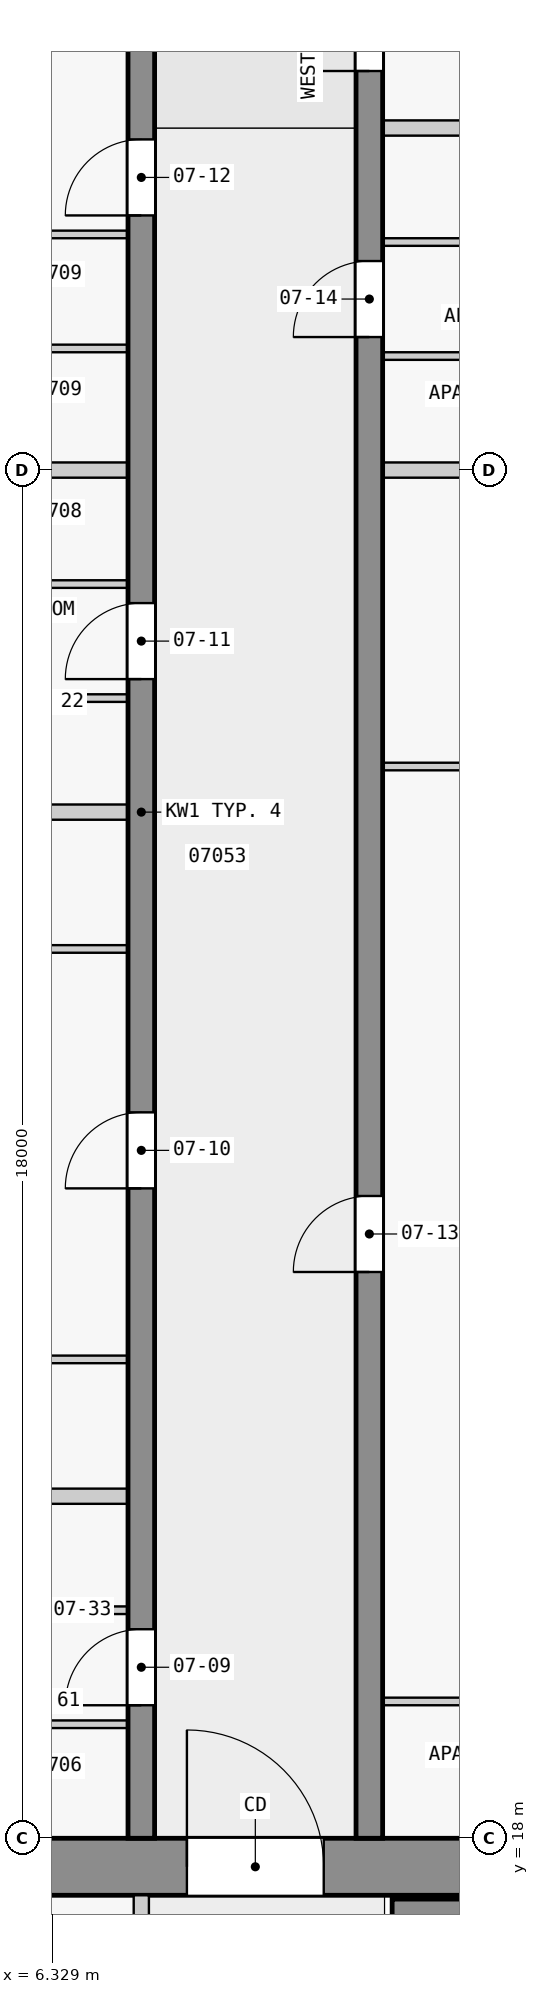
"""IFC4 building model, lengths in metres.
Left out: names, types, materials, properties, quantities, classifications, styles, units other than length and angle.
Written with IfcOpenShell. Run it as: python <this file> out.ifc"""

import sys

from ifc_helpers import new_model, si_unit, direction, frame, frame_2d, origin, place, context, subcontext, project, spatial, rectangle, extrude, element, fill, save


model = new_model("IFC4")
c1 = context("Model", 3, precision=1e-05, world=origin(), true_north=direction((0.0, 1.0)))
c2 = subcontext(c1, "Body", "Model", "MODEL_VIEW")
j1 = project(units=[si_unit("LENGTHUNIT", "METRE"), si_unit("PLANEANGLEUNIT", "RADIAN")], contexts=[c1])
p1 = place(None, origin())
s1 = spatial("IfcSite", under=j1, at=p1, CompositionType="ELEMENT")
p2 = place(p1, origin())
s2 = spatial("IfcBuilding", under=s1, at=p2, CompositionType="ELEMENT")
p3 = place(p2, frame((0.0, 0.0, 33.8)))
s3 = spatial("IfcBuildingStorey", under=s2, at=p3, CompositionType="ELEMENT", Elevation=33.8)
p4 = place(p3, frame((1.55, 17.625, 0.0), z_axis=(0.0, 0.0, 1.0), x_axis=(1.0, 0.0, 0.0)))
e1 = element("IfcWall", 1, at=p4, inside=s3, PredefinedType="SHEAR", context=c2, shape_type="SweptSolid", body=[
    extrude(rectangle(XDim=20.95, YDim=0.75, at=frame_2d((10.475, 0.0))), origin(), (0.0, 0.0, 1.0), 3.25),
])
p5 = place(p4, frame((6.55, 0.0, 0.0)))
e2 = element("IfcOpeningElement", 2, at=p5, cuts=e1, PredefinedType="OPENING", context=c2, shape_type="SweptSolid", body=[
    extrude(rectangle(XDim=1.8, YDim=2.1, at=frame_2d((0.9, 1.05))), frame((0.0, 0.385, 0.0), z_axis=(0.0, -1.0, 0.0), x_axis=(1.0, 0.0, 0.0)), (0.0, 0.0, 1.0), 0.77),
])
p6 = place(p3, frame((10.8, 17.05, 0.0), z_axis=(0.0, 0.0, 1.0), x_axis=(1.0, 0.0, 0.0)))
e3 = element("IfcWall", 3, at=p6, inside=s3, PredefinedType="SHEAR", context=c2, shape_type="SweptSolid", body=[
    extrude(rectangle(XDim=7.8, YDim=0.3, at=frame_2d((3.9, 0.0))), origin(), (0.0, 0.0, 1.0), 3.25),
])
p7 = place(p3, frame((7.5, 18.0, 0.0), z_axis=(0.0, 0.0, 1.0), x_axis=(0.0, 1.0, 0.0)))
e4 = element("IfcWall", 4, at=p7, inside=s3, PredefinedType="SHEAR", context=c2, shape_type="SweptSolid", body=[
    extrude(rectangle(XDim=27.0, YDim=0.35, at=frame_2d((13.5, 0.0))), origin(), (0.0, 0.0, 1.0), 3.25),
])
p8 = place(p7, frame((1.75, 0.0, 0.0)))
e5 = element("IfcOpeningElement", 5, at=p8, cuts=e4, PredefinedType="OPENING", context=c2, shape_type="SweptSolid", body=[
    extrude(rectangle(XDim=1.0, YDim=2.1, at=frame_2d((0.5, 1.05))), frame((0.0, 0.185, 0.0), z_axis=(0.0, -1.0, 0.0), x_axis=(1.0, 0.0, 0.0)), (0.0, 0.0, 1.0), 0.37),
])
p9 = place(p7, frame((8.55, 0.0, 0.0)))
e6 = element("IfcOpeningElement", 6, at=p9, cuts=e4, PredefinedType="OPENING", context=c2, shape_type="SweptSolid", body=[
    extrude(rectangle(XDim=1.0, YDim=2.1, at=frame_2d((0.5, 1.05))), frame((0.0, 0.185, 0.0), z_axis=(0.0, -1.0, 0.0), x_axis=(1.0, 0.0, 0.0)), (0.0, 0.0, 1.0), 0.37),
])
p10 = place(p7, frame((15.25, 0.0, 0.0)))
e7 = element("IfcOpeningElement", 7, at=p10, cuts=e4, PredefinedType="OPENING", context=c2, shape_type="SweptSolid", body=[
    extrude(rectangle(XDim=1.0, YDim=2.1, at=frame_2d((0.5, 1.05))), frame((0.0, 0.185, 0.0), z_axis=(0.0, -1.0, 0.0), x_axis=(1.0, 0.0, 0.0)), (0.0, 0.0, 1.0), 0.37),
])
p11 = place(p7, frame((21.35, 0.0, 0.0)))
e8 = element("IfcOpeningElement", 8, at=p11, cuts=e4, PredefinedType="OPENING", context=c2, shape_type="SweptSolid", body=[
    extrude(rectangle(XDim=1.0, YDim=2.1, at=frame_2d((0.5, 1.05))), frame((0.0, 0.185, 0.0), z_axis=(0.0, -1.0, 0.0), x_axis=(1.0, 0.0, 0.0)), (0.0, 0.0, 1.0), 0.37),
])
p12 = place(p3, frame((10.5, 18.0, 0.0), z_axis=(0.0, 0.0, 1.0), x_axis=(0.0, 1.0, 0.0)))
e9 = element("IfcWall", 9, at=p12, inside=s3, PredefinedType="SHEAR", context=c2, shape_type="SweptSolid", body=[
    extrude(rectangle(XDim=27.0, YDim=0.35, at=frame_2d((13.5, 0.0))), origin(), (0.0, 0.0, 1.0), 3.25),
])
p13 = place(p12, frame((7.45, 0.0, 0.0)))
e10 = element("IfcOpeningElement", 10, at=p13, cuts=e9, PredefinedType="OPENING", context=c2, shape_type="SweptSolid", body=[
    extrude(rectangle(XDim=1.0, YDim=2.1, at=frame_2d((0.5, 1.05))), frame((0.0, 0.185, 0.0), z_axis=(0.0, -1.0, 0.0), x_axis=(1.0, 0.0, 0.0)), (0.0, 0.0, 1.0), 0.37),
])
p14 = place(p12, frame((19.75, 0.0, 0.0)))
e11 = element("IfcOpeningElement", 11, at=p14, cuts=e9, PredefinedType="OPENING", context=c2, shape_type="SweptSolid", body=[
    extrude(rectangle(XDim=1.0, YDim=2.1, at=frame_2d((0.5, 1.05))), frame((0.0, 0.185, 0.0), z_axis=(0.0, -1.0, 0.0), x_axis=(1.0, 0.0, 0.0)), (0.0, 0.0, 1.0), 0.37),
])
p15 = place(p12, frame((23.25, 0.0, 0.0)))
e12 = element("IfcOpeningElement", 12, at=p15, cuts=e9, PredefinedType="OPENING", context=c2, shape_type="SweptSolid", body=[
    extrude(rectangle(XDim=0.9, YDim=2.1, at=frame_2d((0.45, 1.05))), frame((0.0, 0.185, 0.0), z_axis=(0.0, -1.0, 0.0), x_axis=(1.0, 0.0, 0.0)), (0.0, 0.0, 1.0), 0.37),
])
p16 = place(p12, frame((25.45, 0.0, 0.0)))
e13 = element("IfcOpeningElement", 13, at=p16, cuts=e9, PredefinedType="OPENING", context=c2, shape_type="SweptSolid", body=[
    extrude(rectangle(XDim=1.0, YDim=2.1, at=frame_2d((0.5, 1.05))), frame((0.0, 0.185, 0.0), z_axis=(0.0, -1.0, 0.0), x_axis=(1.0, 0.0, 0.0)), (0.0, 0.0, 1.0), 0.37),
])
p17 = place(p3, frame((7.5, 10.1, 0.0), z_axis=(0.0, 0.0, 1.0), x_axis=(0.0, 1.0, 0.0)))
e14 = element("IfcWall", 14, at=p17, inside=s3, PredefinedType="PARTITIONING", context=c2, shape_type="SweptSolid", body=[
    extrude(rectangle(XDim=7.15, YDim=0.2, at=frame_2d((3.575, 0.0))), origin(), (0.0, 0.0, 1.0), 3.25),
])
p18 = place(p17, frame((1.05, 0.0, 0.0)))
e15 = element("IfcOpeningElement", 15, at=p18, cuts=e14, PredefinedType="OPENING", context=c2, shape_type="SweptSolid", body=[
    extrude(rectangle(XDim=0.9, YDim=2.1, at=frame_2d((0.45, 1.05))), frame((0.0, 0.11, 0.0), z_axis=(0.0, -1.0, 0.0), x_axis=(1.0, 0.0, 0.0)), (0.0, 0.0, 1.0), 0.22),
])
p19 = place(p17, frame((4.625, 0.0, 0.0)))
e16 = element("IfcOpeningElement", 16, at=p19, cuts=e14, PredefinedType="OPENING", context=c2, shape_type="SweptSolid", body=[
    extrude(rectangle(XDim=0.9, YDim=2.1, at=frame_2d((0.45, 1.05))), frame((0.0, 0.11, 0.0), z_axis=(0.0, -1.0, 0.0), x_axis=(1.0, 0.0, 0.0)), (0.0, 0.0, 1.0), 0.22),
])
p20 = place(p3, frame((7.325, 19.5, 0.0), z_axis=(0.0, 0.0, 1.0), x_axis=(-1.0, 0.0, 0.0)))
e17 = element("IfcWall", 17, at=p20, inside=s3, PredefinedType="PARTITIONING", context=c2, shape_type="SweptSolid", body=[
    extrude(rectangle(XDim=3.4, YDim=0.1, at=frame_2d((1.7, 0.0))), origin(), (0.0, 0.0, 1.0), 3.25),
])
p21 = place(p20, frame((1.25, 0.0, 0.0)))
e18 = element("IfcOpeningElement", 18, at=p21, cuts=e17, PredefinedType="OPENING", context=c2, shape_type="SweptSolid", body=[
    extrude(rectangle(XDim=0.9, YDim=2.1, at=frame_2d((0.45, 1.05))), frame((0.0, 0.06, 0.0), z_axis=(0.0, -1.0, 0.0), x_axis=(1.0, 0.0, 0.0)), (0.0, 0.0, 1.0), 0.12),
])
p22 = place(p3, frame((14.025, 19.8, 0.0), z_axis=(0.0, 0.0, 1.0), x_axis=(-1.0, 0.0, 0.0)))
e19 = element("IfcWall", 19, at=p22, inside=s3, PredefinedType="PARTITIONING", context=c2, shape_type="SweptSolid", body=[
    extrude(rectangle(XDim=3.35, YDim=0.1, at=frame_2d((1.675, 0.0))), origin(), (0.0, 0.0, 1.0), 3.25),
])
p23 = place(p22, frame((1.25, 0.0, 0.0)))
e20 = element("IfcOpeningElement", 20, at=p23, cuts=e19, PredefinedType="OPENING", context=c2, shape_type="SweptSolid", body=[
    extrude(rectangle(XDim=0.9, YDim=2.1, at=frame_2d((0.45, 1.05))), frame((0.0, 0.06, 0.0), z_axis=(0.0, -1.0, 0.0), x_axis=(1.0, 0.0, 0.0)), (0.0, 0.0, 1.0), 0.12),
])
p24 = place(p3, frame((3.925, 21.0, 0.0), z_axis=(0.0, 0.0, 1.0), x_axis=(1.0, 0.0, 0.0)))
e21 = element("IfcWall", 21, at=p24, inside=s3, PredefinedType="PARTITIONING", context=c2, shape_type="SweptSolid", body=[
    extrude(rectangle(XDim=3.4, YDim=0.1, at=frame_2d((1.7, 0.0))), origin(), (0.0, 0.0, 1.0), 3.25),
])
p25 = place(p24, frame((1.25, 0.0, 0.0)))
e22 = element("IfcOpeningElement", 22, at=p25, cuts=e21, PredefinedType="OPENING", context=c2, shape_type="SweptSolid", body=[
    extrude(rectangle(XDim=0.9, YDim=2.1, at=frame_2d((0.45, 1.05))), frame((0.0, 0.06, 0.0), z_axis=(0.0, -1.0, 0.0), x_axis=(1.0, 0.0, 0.0)), (0.0, 0.0, 1.0), 0.12),
])
p26 = place(p3, frame((7.325, 22.5, 0.0), z_axis=(0.0, 0.0, 1.0), x_axis=(-1.0, 0.0, 0.0)))
e23 = element("IfcWall", 23, at=p26, inside=s3, PredefinedType="PARTITIONING", context=c2, shape_type="SweptSolid", body=[
    extrude(rectangle(XDim=3.3, YDim=0.2, at=frame_2d((1.65, 0.0))), origin(), (0.0, 0.0, 1.0), 3.25),
])
p27 = place(p3, frame((7.325, 24.3, 0.0), z_axis=(0.0, 0.0, 1.0), x_axis=(-1.0, 0.0, 0.0)))
e24 = element("IfcWall", 24, at=p27, inside=s3, PredefinedType="PARTITIONING", context=c2, shape_type="SweptSolid", body=[
    extrude(rectangle(XDim=3.4, YDim=0.1, at=frame_2d((1.7, 0.0))), origin(), (0.0, 0.0, 1.0), 3.25),
])
p28 = place(p27, frame((1.25, 0.0, 0.0)))
e25 = element("IfcOpeningElement", 25, at=p28, cuts=e24, PredefinedType="OPENING", context=c2, shape_type="SweptSolid", body=[
    extrude(rectangle(XDim=0.9, YDim=2.1, at=frame_2d((0.45, 1.05))), frame((0.0, 0.06, 0.0), z_axis=(0.0, -1.0, 0.0), x_axis=(1.0, 0.0, 0.0)), (0.0, 0.0, 1.0), 0.12),
])
p29 = place(p3, frame((3.925, 29.7, 0.0), z_axis=(0.0, 0.0, 1.0), x_axis=(1.0, 0.0, 0.0)))
e26 = element("IfcWall", 26, at=p29, inside=s3, PredefinedType="PARTITIONING", context=c2, shape_type="SweptSolid", body=[
    extrude(rectangle(XDim=3.4, YDim=0.1, at=frame_2d((1.7, 0.0))), origin(), (0.0, 0.0, 1.0), 3.25),
])
p30 = place(p29, frame((1.25, 0.0, 0.0)))
e27 = element("IfcOpeningElement", 27, at=p30, cuts=e26, PredefinedType="OPENING", context=c2, shape_type="SweptSolid", body=[
    extrude(rectangle(XDim=0.9, YDim=2.1, at=frame_2d((0.45, 1.05))), frame((0.0, 0.06, 0.0), z_axis=(0.0, -1.0, 0.0), x_axis=(1.0, 0.0, 0.0)), (0.0, 0.0, 1.0), 0.12),
])
p31 = place(p3, frame((7.325, 31.5, 0.0), z_axis=(0.0, 0.0, 1.0), x_axis=(-1.0, 0.0, 0.0)))
e28 = element("IfcWall", 28, at=p31, inside=s3, PredefinedType="PARTITIONING", context=c2, shape_type="SweptSolid", body=[
    extrude(rectangle(XDim=3.3, YDim=0.2, at=frame_2d((1.65, 0.0))), origin(), (0.0, 0.0, 1.0), 3.25),
])
p32 = place(p3, frame((10.675, 32.1, 0.0), z_axis=(0.0, 0.0, 1.0), x_axis=(1.0, 0.0, 0.0)))
e29 = element("IfcWall", 29, at=p32, inside=s3, PredefinedType="PARTITIONING", context=c2, shape_type="SweptSolid", body=[
    extrude(rectangle(XDim=3.35, YDim=0.1, at=frame_2d((1.675, 0.0))), origin(), (0.0, 0.0, 1.0), 3.25),
])
p33 = place(p32, frame((1.25, 0.0, 0.0)))
e30 = element("IfcOpeningElement", 30, at=p33, cuts=e29, PredefinedType="OPENING", context=c2, shape_type="SweptSolid", body=[
    extrude(rectangle(XDim=0.9, YDim=2.1, at=frame_2d((0.45, 1.05))), frame((0.0, 0.06, 0.0), z_axis=(0.0, -1.0, 0.0), x_axis=(1.0, 0.0, 0.0)), (0.0, 0.0, 1.0), 0.12),
])
p34 = place(p3, frame((7.325, 33.0, 0.0), z_axis=(0.0, 0.0, 1.0), x_axis=(-1.0, 0.0, 0.0)))
e31 = element("IfcWall", 31, at=p34, inside=s3, PredefinedType="PARTITIONING", context=c2, shape_type="SweptSolid", body=[
    extrude(rectangle(XDim=3.4, YDim=0.1, at=frame_2d((1.7, 0.0))), origin(), (0.0, 0.0, 1.0), 3.25),
])
p35 = place(p34, frame((1.25, 0.0, 0.0)))
e32 = element("IfcOpeningElement", 32, at=p35, cuts=e31, PredefinedType="OPENING", context=c2, shape_type="SweptSolid", body=[
    extrude(rectangle(XDim=0.9, YDim=2.1, at=frame_2d((0.45, 1.05))), frame((0.0, 0.06, 0.0), z_axis=(0.0, -1.0, 0.0), x_axis=(1.0, 0.0, 0.0)), (0.0, 0.0, 1.0), 0.12),
])
p36 = place(p3, frame((3.975, 34.5, 0.0), z_axis=(0.0, 0.0, 1.0), x_axis=(1.0, 0.0, 0.0)))
e33 = element("IfcWall", 33, at=p36, inside=s3, PredefinedType="PARTITIONING", context=c2, shape_type="SweptSolid", body=[
    extrude(rectangle(XDim=3.35, YDim=0.1, at=frame_2d((1.675, 0.0))), origin(), (0.0, 0.0, 1.0), 3.25),
])
p37 = place(p36, frame((1.25, 0.0, 0.0)))
e34 = element("IfcOpeningElement", 34, at=p37, cuts=e33, PredefinedType="OPENING", context=c2, shape_type="SweptSolid", body=[
    extrude(rectangle(XDim=0.9, YDim=2.1, at=frame_2d((0.45, 1.05))), frame((0.0, 0.06, 0.0), z_axis=(0.0, -1.0, 0.0), x_axis=(1.0, 0.0, 0.0)), (0.0, 0.0, 1.0), 0.12),
])
p38 = place(p3, frame((7.325, 36.0, 0.0), z_axis=(0.0, 0.0, 1.0), x_axis=(-1.0, 0.0, 0.0)))
e35 = element("IfcWall", 35, at=p38, inside=s3, PredefinedType="PARTITIONING", context=c2, shape_type="SweptSolid", body=[
    extrude(rectangle(XDim=3.4, YDim=0.2, at=frame_2d((1.7, 0.0))), origin(), (0.0, 0.0, 1.0), 3.25),
])
p39 = place(p3, frame((16.6, 36.0, 0.0), z_axis=(0.0, 0.0, 1.0), x_axis=(-1.0, 0.0, 0.0)))
e36 = element("IfcWall", 36, at=p39, inside=s3, PredefinedType="PARTITIONING", context=c2, shape_type="SweptSolid", body=[
    extrude(rectangle(XDim=5.925, YDim=0.2, at=frame_2d((2.962, 0.0))), origin(), (0.0, 0.0, 1.0), 3.25),
])
p40 = place(p3, frame((14.025, 37.5, 0.0), z_axis=(0.0, 0.0, 1.0), x_axis=(-1.0, 0.0, 0.0)))
e37 = element("IfcWall", 37, at=p40, inside=s3, PredefinedType="PARTITIONING", context=c2, shape_type="SweptSolid", body=[
    extrude(rectangle(XDim=3.35, YDim=0.1, at=frame_2d((1.675, 0.0))), origin(), (0.0, 0.0, 1.0), 3.25),
])
p41 = place(p40, frame((1.25, 0.0, 0.0)))
e38 = element("IfcOpeningElement", 38, at=p41, cuts=e37, PredefinedType="OPENING", context=c2, shape_type="SweptSolid", body=[
    extrude(rectangle(XDim=0.9, YDim=2.1, at=frame_2d((0.45, 1.05))), frame((0.0, 0.06, 0.0), z_axis=(0.0, -1.0, 0.0), x_axis=(1.0, 0.0, 0.0)), (0.0, 0.0, 1.0), 0.12),
])
p42 = place(p3, frame((7.325, 37.6, 0.0), z_axis=(0.0, 0.0, 1.0), x_axis=(-1.0, 0.0, 0.0)))
e39 = element("IfcWall", 39, at=p42, inside=s3, PredefinedType="PARTITIONING", context=c2, shape_type="SweptSolid", body=[
    extrude(rectangle(XDim=3.35, YDim=0.1, at=frame_2d((1.675, 0.0))), origin(), (0.0, 0.0, 1.0), 3.25),
])
p43 = place(p3, frame((10.675, 39.0, 0.0), z_axis=(0.0, 0.0, 1.0), x_axis=(1.0, 0.0, 0.0)))
e40 = element("IfcWall", 40, at=p43, inside=s3, PredefinedType="PARTITIONING", context=c2, shape_type="SweptSolid", body=[
    extrude(rectangle(XDim=3.4, YDim=0.1, at=frame_2d((1.7, 0.0))), origin(), (0.0, 0.0, 1.0), 3.25),
])
p44 = place(p43, frame((1.25, 0.0, 0.0)))
e41 = element("IfcOpeningElement", 41, at=p44, cuts=e40, PredefinedType="OPENING", context=c2, shape_type="SweptSolid", body=[
    extrude(rectangle(XDim=0.9, YDim=2.1, at=frame_2d((0.45, 1.05))), frame((0.0, 0.06, 0.0), z_axis=(0.0, -1.0, 0.0), x_axis=(1.0, 0.0, 0.0)), (0.0, 0.0, 1.0), 0.12),
])
p45 = place(p3, frame((7.325, 39.1, 0.0), z_axis=(0.0, 0.0, 1.0), x_axis=(-1.0, 0.0, 0.0)))
e42 = element("IfcWall", 42, at=p45, inside=s3, PredefinedType="PARTITIONING", context=c2, shape_type="SweptSolid", body=[
    extrude(rectangle(XDim=3.35, YDim=0.1, at=frame_2d((1.675, 0.0))), origin(), (0.0, 0.0, 1.0), 3.25),
])
p46 = place(p45, frame((1.25, 0.0, 0.0)))
e43 = element("IfcOpeningElement", 43, at=p46, cuts=e42, PredefinedType="OPENING", context=c2, shape_type="SweptSolid", body=[
    extrude(rectangle(XDim=0.9, YDim=2.1, at=frame_2d((0.45, 1.05))), frame((0.0, 0.06, 0.0), z_axis=(0.0, -1.0, 0.0), x_axis=(1.0, 0.0, 0.0)), (0.0, 0.0, 1.0), 0.12),
])
p47 = place(p3, frame((13.975, 40.5, 0.0), z_axis=(0.0, 0.0, 1.0), x_axis=(-1.0, 0.0, 0.0)))
e44 = element("IfcWall", 44, at=p47, inside=s3, PredefinedType="PARTITIONING", context=c2, shape_type="SweptSolid", body=[
    extrude(rectangle(XDim=3.3, YDim=0.2, at=frame_2d((1.65, 0.0))), origin(), (0.0, 0.0, 1.0), 3.25),
])
p48 = place(p5, origin())
e45 = element("IfcDoor", 45, at=p48, inside=s3, OperationType="DOUBLE_DOOR_SINGLE_SWING", PredefinedType="DOOR", context=c2, shape_type="SweptSolid", body=[
    extrude(rectangle(XDim=1.8, YDim=2.1, at=frame_2d((0.9, 1.05))), frame((0.0, 0.025, 0.0), z_axis=(0.0, -1.0, 0.0), x_axis=(1.0, 0.0, 0.0)), (0.0, 0.0, 1.0), 0.05),
])
fill(e2, e45)
p49 = place(p8, origin())
e46 = element("IfcDoor", 46, at=p49, inside=s3, OperationType="SINGLE_SWING_LEFT", PredefinedType="DOOR", context=c2, shape_type="SweptSolid", body=[
    extrude(rectangle(XDim=1.0, YDim=2.1, at=frame_2d((0.5, 1.05))), frame((0.0, 0.025, 0.0), z_axis=(0.0, -1.0, 0.0), x_axis=(1.0, 0.0, 0.0)), (0.0, 0.0, 1.0), 0.05),
])
fill(e5, e46)
p50 = place(p9, origin())
e47 = element("IfcDoor", 47, at=p50, inside=s3, OperationType="SINGLE_SWING_LEFT", PredefinedType="DOOR", context=c2, shape_type="SweptSolid", body=[
    extrude(rectangle(XDim=1.0, YDim=2.1, at=frame_2d((0.5, 1.05))), frame((0.0, 0.025, 0.0), z_axis=(0.0, -1.0, 0.0), x_axis=(1.0, 0.0, 0.0)), (0.0, 0.0, 1.0), 0.05),
])
fill(e6, e47)
p51 = place(p10, origin())
e48 = element("IfcDoor", 48, at=p51, inside=s3, OperationType="SINGLE_SWING_RIGHT", PredefinedType="DOOR", context=c2, shape_type="SweptSolid", body=[
    extrude(rectangle(XDim=1.0, YDim=2.1, at=frame_2d((0.5, 1.05))), frame((0.0, 0.025, 0.0), z_axis=(0.0, -1.0, 0.0), x_axis=(1.0, 0.0, 0.0)), (0.0, 0.0, 1.0), 0.05),
])
fill(e7, e48)
p52 = place(p11, origin())
e49 = element("IfcDoor", 49, at=p52, inside=s3, OperationType="SINGLE_SWING_RIGHT", PredefinedType="DOOR", context=c2, shape_type="SweptSolid", body=[
    extrude(rectangle(XDim=1.0, YDim=2.1, at=frame_2d((0.5, 1.05))), frame((0.0, 0.025, 0.0), z_axis=(0.0, -1.0, 0.0), x_axis=(1.0, 0.0, 0.0)), (0.0, 0.0, 1.0), 0.05),
])
fill(e8, e49)
p53 = place(p13, origin())
e50 = element("IfcDoor", 50, at=p53, inside=s3, OperationType="SINGLE_SWING_LEFT", PredefinedType="DOOR", context=c2, shape_type="SweptSolid", body=[
    extrude(rectangle(XDim=1.0, YDim=2.1, at=frame_2d((0.5, 1.05))), frame((0.0, 0.025, 0.0), z_axis=(0.0, -1.0, 0.0), x_axis=(1.0, 0.0, 0.0)), (0.0, 0.0, 1.0), 0.05),
])
fill(e10, e50)
p54 = place(p14, origin())
e51 = element("IfcDoor", 51, at=p54, inside=s3, OperationType="SINGLE_SWING_RIGHT", PredefinedType="DOOR", context=c2, shape_type="SweptSolid", body=[
    extrude(rectangle(XDim=1.0, YDim=2.1, at=frame_2d((0.5, 1.05))), frame((0.0, 0.025, 0.0), z_axis=(0.0, -1.0, 0.0), x_axis=(1.0, 0.0, 0.0)), (0.0, 0.0, 1.0), 0.05),
])
fill(e11, e51)
p55 = place(p15, origin())
e52 = element("IfcDoor", 52, at=p55, inside=s3, OperationType="SINGLE_SWING_RIGHT", PredefinedType="DOOR", context=c2, shape_type="SweptSolid", body=[
    extrude(rectangle(XDim=0.9, YDim=2.1, at=frame_2d((0.45, 1.05))), frame((0.0, 0.025, 0.0), z_axis=(0.0, -1.0, 0.0), x_axis=(1.0, 0.0, 0.0)), (0.0, 0.0, 1.0), 0.05),
])
fill(e12, e52)
save(model, sys.argv[1])
